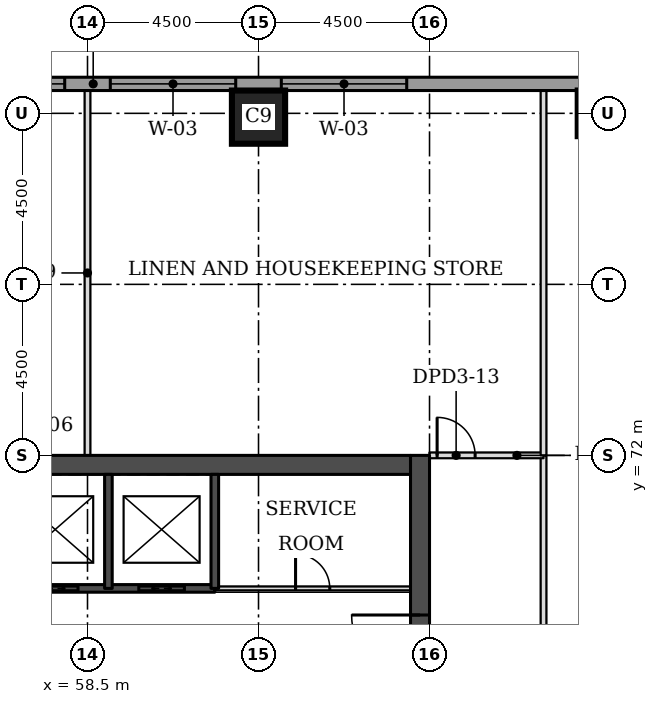
"""IFC4 building model, lengths in metres.
Left out: names, types, materials, properties, quantities, classifications, styles, units other than length and angle.
Written with IfcOpenShell. Run it as: python <this file> out.ifc"""

import sys

from ifc_helpers import new_model, si_unit, direction, frame, frame_2d, origin, origin_2d, place, context, subcontext, project, spatial, rectangle, extrude, element, fill, save


model = new_model("IFC4")
c1 = context("Model", 3, precision=1e-05, world=origin(), true_north=direction((0.0, 1.0)))
c2 = subcontext(c1, "Body", "Model", "MODEL_VIEW")
j1 = project(units=[si_unit("LENGTHUNIT", "METRE"), si_unit("PLANEANGLEUNIT", "RADIAN")], contexts=[c1])
p1 = place(None, origin())
s1 = spatial("IfcSite", under=j1, at=p1, CompositionType="ELEMENT")
p2 = place(p1, origin())
s2 = spatial("IfcBuilding", under=s1, at=p2, CompositionType="ELEMENT")
p3 = place(p2, frame((0.0, 0.0, 18.5)))
s3 = spatial("IfcBuildingStorey", under=s2, at=p3, CompositionType="ELEMENT", Elevation=18.5)
p4 = place(p3, frame((63.0, 80.9, 0.0), z_axis=(0.0, 0.0, 1.0), x_axis=(1.0, 0.0, 0.0)))
e1 = element("IfcColumn", 1, at=p4, inside=s3, PredefinedType="COLUMN", context=c2, shape_type="SweptSolid", body=[
    extrude(rectangle(XDim=1.4, YDim=1.4, at=origin_2d()), origin(), (0.0, 0.0, 1.0), 4.6),
])
p5 = place(p3, frame((72.0, 81.0, 0.0), z_axis=(0.0, 0.0, 1.0), x_axis=(1.0, 0.0, 0.0)))
e2 = element("IfcColumn", 2, at=p5, inside=s3, PredefinedType="COLUMN", context=c2, shape_type="SweptSolid", body=[
    extrude(rectangle(XDim=1.2, YDim=1.2, at=origin_2d()), origin(), (0.0, 0.0, 1.0), 4.6),
])
p6 = place(p3, frame((45.5, 71.75, 0.0), z_axis=(0.0, 0.0, 1.0), x_axis=(1.0, 0.0, 0.0)))
e3 = element("IfcWall", 3, at=p6, inside=s3, PredefinedType="SHEAR", context=c2, shape_type="SweptSolid", body=[
    extrude(rectangle(XDim=21.5, YDim=0.5, at=frame_2d((10.75, 0.0))), origin(), (0.0, 0.0, 1.0), 4.6),
])
p7 = place(p3, frame((67.25, 49.5, 0.0), z_axis=(0.0, 0.0, 1.0), x_axis=(0.0, 1.0, 0.0)))
e4 = element("IfcWall", 4, at=p7, inside=s3, PredefinedType="SHEAR", context=c2, shape_type="SweptSolid", body=[
    extrude(rectangle(XDim=22.5, YDim=0.5, at=frame_2d((11.25, 0.0))), origin(), (0.0, 0.0, 1.0), 4.6),
])
p8 = place(p7, frame((4.2, 0.0, 0.0)))
e5 = element("IfcOpeningElement", 5, at=p8, cuts=e4, PredefinedType="OPENING", context=c2, shape_type="SweptSolid", body=[
    extrude(rectangle(XDim=1.8, YDim=2.1, at=frame_2d((0.9, 1.05))), frame((0.0, 0.26, 0.0), z_axis=(0.0, -1.0, 0.0), x_axis=(1.0, 0.0, 0.0)), (0.0, 0.0, 1.0), 0.52),
])
p9 = place(p7, frame((6.9, 0.0, 0.0)))
e6 = element("IfcOpeningElement", 6, at=p9, cuts=e4, PredefinedType="OPENING", context=c2, shape_type="SweptSolid", body=[
    extrude(rectangle(XDim=1.1, YDim=2.1, at=frame_2d((0.55, 1.05))), frame((0.0, 0.26, 0.0), z_axis=(0.0, -1.0, 0.0), x_axis=(1.0, 0.0, 0.0)), (0.0, 0.0, 1.0), 0.52),
])
p10 = place(p7, frame((13.6, 0.0, 0.0)))
e7 = element("IfcOpeningElement", 7, at=p10, cuts=e4, PredefinedType="OPENING", context=c2, shape_type="SweptSolid", body=[
    extrude(rectangle(XDim=1.1, YDim=2.1, at=frame_2d((0.55, 1.05))), frame((0.0, 0.26, 0.0), z_axis=(0.0, -1.0, 0.0), x_axis=(1.0, 0.0, 0.0)), (0.0, 0.0, 1.0), 0.52),
])
p11 = place(p7, frame((16.5, 0.0, 0.0)))
e8 = element("IfcOpeningElement", 8, at=p11, cuts=e4, PredefinedType="OPENING", context=c2, shape_type="SweptSolid", body=[
    extrude(rectangle(XDim=1.8, YDim=2.1, at=frame_2d((0.9, 1.05))), frame((0.0, 0.26, 0.0), z_axis=(0.0, -1.0, 0.0), x_axis=(1.0, 0.0, 0.0)), (0.0, 0.0, 1.0), 0.52),
])
p12 = place(p3, frame((72.394, 81.775, 0.0), z_axis=(0.0, 0.0, 1.0), x_axis=(-1.0, 0.0, 0.0)))
e9 = element("IfcWall", 9, at=p12, inside=s3, PredefinedType="STANDARD", context=c2, shape_type="SweptSolid", body=[
    extrude(rectangle(XDim=32.287, YDim=0.35, at=frame_2d((16.144, 0.0))), origin(), (0.0, 0.0, 1.0), 4.355),
])
p13 = place(p12, frame((5.493, 0.0, 0.9)))
e10 = element("IfcOpeningElement", 10, at=p13, cuts=e9, PredefinedType="OPENING", context=c2, shape_type="SweptSolid", body=[
    extrude(rectangle(XDim=3.3, YDim=2.7, at=frame_2d((1.65, 1.35))), frame((0.0, 0.185, 0.0), z_axis=(0.0, -1.0, 0.0), x_axis=(1.0, 0.0, 0.0)), (0.0, 0.0, 1.0), 0.37),
])
p14 = place(p12, frame((9.993, 0.0, 0.9)))
e11 = element("IfcOpeningElement", 11, at=p14, cuts=e9, PredefinedType="OPENING", context=c2, shape_type="SweptSolid", body=[
    extrude(rectangle(XDim=3.3, YDim=2.7, at=frame_2d((1.65, 1.35))), frame((0.0, 0.185, 0.0), z_axis=(0.0, -1.0, 0.0), x_axis=(1.0, 0.0, 0.0)), (0.0, 0.0, 1.0), 0.37),
])
p15 = place(p12, frame((14.493, 0.0, 0.9)))
e12 = element("IfcOpeningElement", 12, at=p15, cuts=e9, PredefinedType="OPENING", context=c2, shape_type="SweptSolid", body=[
    extrude(rectangle(XDim=3.3, YDim=2.7, at=frame_2d((1.65, 1.35))), frame((0.0, 0.185, 0.0), z_axis=(0.0, -1.0, 0.0), x_axis=(1.0, 0.0, 0.0)), (0.0, 0.0, 1.0), 0.37),
])
p16 = place(p12, frame((18.993, 0.0, 0.9)))
e13 = element("IfcOpeningElement", 13, at=p16, cuts=e9, PredefinedType="OPENING", context=c2, shape_type="SweptSolid", body=[
    extrude(rectangle(XDim=3.3, YDim=2.7, at=frame_2d((1.65, 1.35))), frame((0.0, 0.185, 0.0), z_axis=(0.0, -1.0, 0.0), x_axis=(1.0, 0.0, 0.0)), (0.0, 0.0, 1.0), 0.37),
])
p17 = place(p12, frame((23.493, 0.0, 0.9)))
e14 = element("IfcOpeningElement", 14, at=p17, cuts=e9, PredefinedType="OPENING", context=c2, shape_type="SweptSolid", body=[
    extrude(rectangle(XDim=3.3, YDim=2.7, at=frame_2d((1.65, 1.35))), frame((0.0, 0.185, 0.0), z_axis=(0.0, -1.0, 0.0), x_axis=(1.0, 0.0, 0.0)), (0.0, 0.0, 1.0), 0.37),
])
p18 = place(p3, frame((70.5, 49.5, 0.0), z_axis=(0.0, 0.0, 1.0), x_axis=(0.0, 1.0, 0.0)))
e15 = element("IfcWall", 15, at=p18, inside=s3, PredefinedType="PARTITIONING", context=c2, shape_type="SweptSolid", body=[
    extrude(rectangle(XDim=22.5, YDim=0.15, at=frame_2d((11.25, 0.0))), origin(), (0.0, 0.0, 1.0), 4.38),
])
p19 = place(p18, frame((10.0, 0.0, 0.0)))
e16 = element("IfcOpeningElement", 16, at=p19, cuts=e15, PredefinedType="OPENING", context=c2, shape_type="SweptSolid", body=[
    extrude(rectangle(XDim=1.0, YDim=2.1, at=frame_2d((0.5, 1.05))), frame((0.0, 0.085, 0.0), z_axis=(0.0, -1.0, 0.0), x_axis=(1.0, 0.0, 0.0)), (0.0, 0.0, 1.0), 0.17),
])
p20 = place(p3, frame((58.5, 72.0, 0.0), z_axis=(0.0, 0.0, 1.0), x_axis=(0.0, 1.0, 0.0)))
e17 = element("IfcWall", 17, at=p20, inside=s3, PredefinedType="PARTITIONING", context=c2, shape_type="SweptSolid", body=[
    extrude(rectangle(XDim=9.6, YDim=0.15, at=frame_2d((4.8, 0.0))), origin(), (0.0, 0.0, 1.0), 4.38),
])
p21 = place(p3, frame((67.5, 72.0, 0.0), z_axis=(0.0, 0.0, 1.0), x_axis=(1.0, 0.0, 0.0)))
e18 = element("IfcWall", 18, at=p21, inside=s3, PredefinedType="PARTITIONING", context=c2, shape_type="SweptSolid", body=[
    extrude(rectangle(XDim=3.0, YDim=0.15, at=frame_2d((1.5, 0.0))), origin(), (0.0, 0.0, 1.0), 4.38),
])
p22 = place(p21, frame((0.2, 0.0, 0.0)))
e19 = element("IfcOpeningElement", 19, at=p22, cuts=e18, PredefinedType="OPENING", context=c2, shape_type="SweptSolid", body=[
    extrude(rectangle(XDim=1.0, YDim=2.1, at=frame_2d((0.5, 1.05))), frame((0.0, 0.085, 0.0), z_axis=(0.0, -1.0, 0.0), x_axis=(1.0, 0.0, 0.0)), (0.0, 0.0, 1.0), 0.17),
])
p23 = place(p3, frame((70.5, 72.0, 0.0), z_axis=(0.0, 0.0, 1.0), x_axis=(0.0, 1.0, 0.0)))
e20 = element("IfcWall", 20, at=p23, inside=s3, PredefinedType="PARTITIONING", context=c2, shape_type="SweptSolid", body=[
    extrude(rectangle(XDim=9.6, YDim=0.15, at=frame_2d((4.8, 0.0))), origin(), (0.0, 0.0, 1.0), 4.38),
])
p24 = place(p3, frame((61.85, 68.5, 0.0), z_axis=(0.0, 0.0, 1.0), x_axis=(1.0, 0.0, 0.0)))
e21 = element("IfcWall", 21, at=p24, inside=s3, PredefinedType="PARTITIONING", context=c2, shape_type="SweptSolid", body=[
    extrude(rectangle(XDim=5.15, YDim=0.1, at=frame_2d((2.575, 0.0))), origin(), (0.0, 0.0, 1.0), 4.38),
])
p25 = place(p24, frame((2.125, 0.0, 0.0)))
e22 = element("IfcOpeningElement", 22, at=p25, cuts=e21, PredefinedType="OPENING", context=c2, shape_type="SweptSolid", body=[
    extrude(rectangle(XDim=0.9, YDim=2.1, at=frame_2d((0.45, 1.05))), frame((0.0, 0.06, 0.0), z_axis=(0.0, -1.0, 0.0), x_axis=(1.0, 0.0, 0.0)), (0.0, 0.0, 1.0), 0.12),
])
p26 = place(p3, frame((50.65, 68.5, 0.0), z_axis=(0.0, 0.0, 1.0), x_axis=(1.0, 0.0, 0.0)))
e23 = element("IfcWall", 23, at=p26, inside=s3, PredefinedType="SOLIDWALL", context=c2, shape_type="SweptSolid", body=[
    extrude(rectangle(XDim=11.2, YDim=0.2, at=frame_2d((5.6, 0.0))), origin(), (0.0, 0.0, 1.0), 4.38),
])
p27 = place(p26, frame((0.8, 0.0, 0.0)))
e24 = element("IfcOpeningElement", 24, at=p27, cuts=e23, PredefinedType="OPENING", context=c2, shape_type="SweptSolid", body=[
    extrude(rectangle(XDim=1.2, YDim=2.1, at=frame_2d((0.6, 1.05))), frame((0.0, 0.11, 0.0), z_axis=(0.0, -1.0, 0.0), x_axis=(1.0, 0.0, 0.0)), (0.0, 0.0, 1.0), 0.22),
])
p28 = place(p26, frame((3.6, 0.0, 0.0)))
e25 = element("IfcOpeningElement", 25, at=p28, cuts=e23, PredefinedType="OPENING", context=c2, shape_type="SweptSolid", body=[
    extrude(rectangle(XDim=1.2, YDim=2.1, at=frame_2d((0.6, 1.05))), frame((0.0, 0.11, 0.0), z_axis=(0.0, -1.0, 0.0), x_axis=(1.0, 0.0, 0.0)), (0.0, 0.0, 1.0), 0.22),
])
p29 = place(p26, frame((6.4, 0.0, 0.0)))
e26 = element("IfcOpeningElement", 26, at=p29, cuts=e23, PredefinedType="OPENING", context=c2, shape_type="SweptSolid", body=[
    extrude(rectangle(XDim=1.2, YDim=2.1, at=frame_2d((0.6, 1.05))), frame((0.0, 0.11, 0.0), z_axis=(0.0, -1.0, 0.0), x_axis=(1.0, 0.0, 0.0)), (0.0, 0.0, 1.0), 0.22),
])
p30 = place(p26, frame((9.2, 0.0, 0.0)))
e27 = element("IfcOpeningElement", 27, at=p30, cuts=e23, PredefinedType="OPENING", context=c2, shape_type="SweptSolid", body=[
    extrude(rectangle(XDim=1.2, YDim=2.1, at=frame_2d((0.6, 1.05))), frame((0.0, 0.11, 0.0), z_axis=(0.0, -1.0, 0.0), x_axis=(1.0, 0.0, 0.0)), (0.0, 0.0, 1.0), 0.22),
])
for number, where, z_axis, x_axis in (
    (28, (59.05, 68.5, 0.0), (0.0, 0.0, 1.0), (0.0, 1.0, 0.0)),
    (29, (61.85, 68.5, 0.0), (0.0, 0.0, 1.0), (0.0, 1.0, 0.0)),
):
    element("IfcWall", number, at=place(p3, frame(where, z_axis=z_axis, x_axis=x_axis)), inside=s3, PredefinedType="SOLIDWALL", context=c2, shape_type="SweptSolid", body=[
        extrude(rectangle(XDim=3.0, YDim=0.2, at=frame_2d((1.5, 0.0))), origin(), (0.0, 0.0, 1.0), 4.38),
    ])
p31 = place(p13, origin())
e30 = element("IfcWindow", 30, at=p31, inside=s3, PartitioningType="SINGLE_PANEL", PredefinedType="WINDOW", context=c2, shape_type="SweptSolid", body=[
    extrude(rectangle(XDim=3.3, YDim=2.7, at=frame_2d((1.65, 1.35))), frame((0.0, 0.085, 0.0), z_axis=(0.0, -1.0, 0.0), x_axis=(1.0, 0.0, 0.0)), (0.0, 0.0, 1.0), 0.06),
])
fill(e10, e30)
p32 = place(p14, origin())
e31 = element("IfcWindow", 31, at=p32, inside=s3, PartitioningType="SINGLE_PANEL", PredefinedType="WINDOW", context=c2, shape_type="SweptSolid", body=[
    extrude(rectangle(XDim=3.3, YDim=2.7, at=frame_2d((1.65, 1.35))), frame((0.0, 0.085, 0.0), z_axis=(0.0, -1.0, 0.0), x_axis=(1.0, 0.0, 0.0)), (0.0, 0.0, 1.0), 0.06),
])
fill(e11, e31)
p33 = place(p15, origin())
e32 = element("IfcWindow", 32, at=p33, inside=s3, PartitioningType="SINGLE_PANEL", PredefinedType="WINDOW", context=c2, shape_type="SweptSolid", body=[
    extrude(rectangle(XDim=3.3, YDim=2.7, at=frame_2d((1.65, 1.35))), frame((0.0, 0.085, 0.0), z_axis=(0.0, -1.0, 0.0), x_axis=(1.0, 0.0, 0.0)), (0.0, 0.0, 1.0), 0.06),
])
fill(e12, e32)
p34 = place(p22, origin())
e33 = element("IfcDoor", 33, at=p34, inside=s3, OperationType="SINGLE_SWING_LEFT", PredefinedType="DOOR", context=c2, shape_type="SweptSolid", body=[
    extrude(rectangle(XDim=1.0, YDim=2.1, at=frame_2d((0.5, 1.05))), frame((0.0, 0.025, 0.0), z_axis=(0.0, -1.0, 0.0), x_axis=(1.0, 0.0, 0.0)), (0.0, 0.0, 1.0), 0.05),
])
fill(e19, e33)
p35 = place(p29, origin())
e34 = element("IfcDoor", 34, at=p35, inside=s3, OperationType="DOUBLE_DOOR_SLIDING", PredefinedType="DOOR", context=c2, shape_type="SweptSolid", body=[
    extrude(rectangle(XDim=1.2, YDim=2.1, at=frame_2d((0.6, 1.05))), frame((0.0, 0.025, 0.0), z_axis=(0.0, -1.0, 0.0), x_axis=(1.0, 0.0, 0.0)), (0.0, 0.0, 1.0), 0.05),
])
fill(e26, e34)
p36 = place(p30, origin())
e35 = element("IfcDoor", 35, at=p36, inside=s3, OperationType="DOUBLE_DOOR_SLIDING", PredefinedType="DOOR", context=c2, shape_type="SweptSolid", body=[
    extrude(rectangle(XDim=1.2, YDim=2.1, at=frame_2d((0.6, 1.05))), frame((0.0, 0.025, 0.0), z_axis=(0.0, -1.0, 0.0), x_axis=(1.0, 0.0, 0.0)), (0.0, 0.0, 1.0), 0.05),
])
fill(e27, e35)
p37 = place(p11, origin())
e36 = element("IfcDoor", 36, at=p37, inside=s3, OperationType="SINGLE_SWING_RIGHT", PredefinedType="DOOR", context=c2, shape_type="SweptSolid", body=[
    extrude(rectangle(XDim=1.8, YDim=2.1, at=frame_2d((0.9, 1.05))), frame((0.0, 0.025, 0.0), z_axis=(0.0, -1.0, 0.0), x_axis=(1.0, 0.0, 0.0)), (0.0, 0.0, 1.0), 0.05),
])
fill(e8, e36)
p38 = place(p25, origin())
e37 = element("IfcDoor", 37, at=p38, inside=s3, OperationType="SINGLE_SWING_LEFT", PredefinedType="DOOR", context=c2, shape_type="SweptSolid", body=[
    extrude(rectangle(XDim=0.9, YDim=2.1, at=frame_2d((0.45, 1.05))), frame((0.0, 0.025, 0.0), z_axis=(0.0, -1.0, 0.0), x_axis=(1.0, 0.0, 0.0)), (0.0, 0.0, 1.0), 0.05),
])
fill(e22, e37)
save(model, sys.argv[1])
